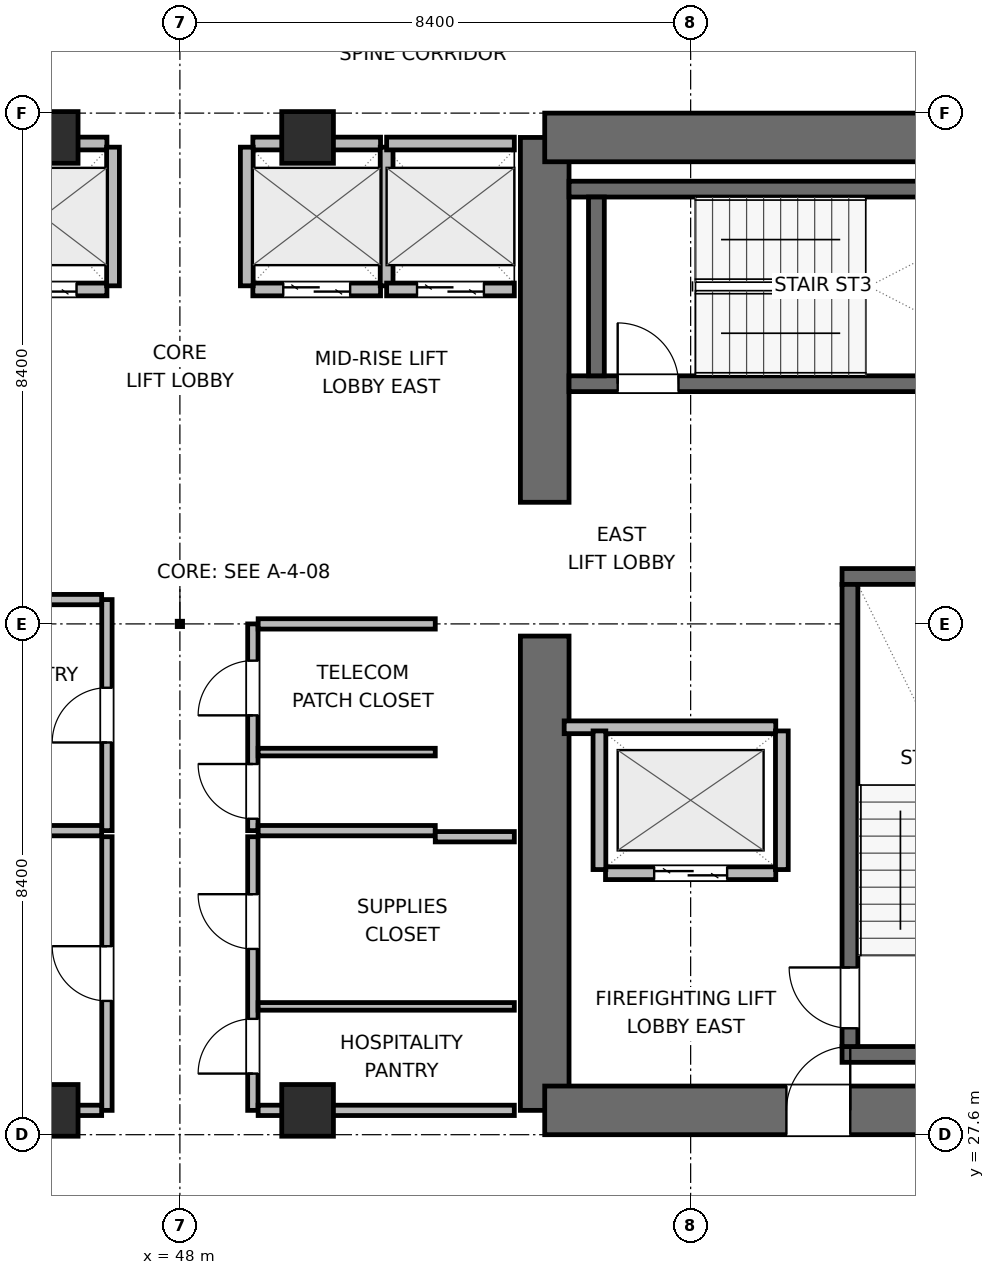
"""IFC4 building model, lengths in metres.
Left out: names, types, materials, properties, quantities, classifications, styles, units other than length and angle.
Written with IfcOpenShell. Run it as: python <this file> out.ifc"""

import sys

from ifc_helpers import new_model, si_unit, direction, frame, frame_2d, origin, origin_2d, place, context, subcontext, project, spatial, rectangle, extrude, element, fill, save


model = new_model("IFC4")
c1 = context("Model", 3, precision=1e-05, world=origin(), true_north=direction((0.0, 1.0)))
c2 = subcontext(c1, "Body", "Model", "MODEL_VIEW")
j1 = project(units=[si_unit("LENGTHUNIT", "METRE"), si_unit("PLANEANGLEUNIT", "RADIAN")], contexts=[c1])
p1 = place(None, origin())
s1 = spatial("IfcSite", under=j1, at=p1, CompositionType="ELEMENT")
p2 = place(p1, origin())
s2 = spatial("IfcBuilding", under=s1, at=p2, CompositionType="ELEMENT")
p3 = place(p2, frame((0.0, 0.0, 154.5)))
s3 = spatial("IfcBuildingStorey", under=s2, at=p3, CompositionType="ELEMENT", Elevation=154.5)
p4 = place(p3, frame((54.0, 28.0, 0.0), z_axis=(0.0, 0.0, 1.0), x_axis=(0.0, 1.0, 0.0)))
e1 = element("IfcWall", 1, at=p4, inside=s3, PredefinedType="SHEAR", context=c2, shape_type="SweptSolid", body=[
    extrude(rectangle(XDim=7.8, YDim=0.8, at=frame_2d((3.9, 0.0))), origin(), (0.0, 0.0, 1.0), 3.9),
])
p5 = place(p3, frame((54.0, 38.0, 0.0), z_axis=(0.0, 0.0, 1.0), x_axis=(0.0, 1.0, 0.0)))
e2 = element("IfcWall", 2, at=p5, inside=s3, PredefinedType="SHEAR", context=c2, shape_type="SweptSolid", body=[
    extrude(rectangle(XDim=6.0, YDim=0.8, at=frame_2d((3.0, 0.0))), origin(), (0.0, 0.0, 1.0), 3.9),
])
p6 = place(p3, frame((54.0, 28.0, 0.0), z_axis=(0.0, 0.0, 1.0), x_axis=(1.0, 0.0, 0.0)))
e3 = element("IfcWall", 3, at=p6, inside=s3, PredefinedType="SHEAR", context=c2, shape_type="SweptSolid", body=[
    extrude(rectangle(XDim=9.2, YDim=0.8, at=frame_2d((4.6, 0.0))), origin(), (0.0, 0.0, 1.0), 3.9),
])
p7 = place(p6, frame((3.975, 0.0, 0.0)))
e4 = element("IfcOpeningElement", 4, at=p7, cuts=e3, PredefinedType="OPENING", context=c2, shape_type="SweptSolid", body=[
    extrude(rectangle(XDim=1.05, YDim=2.04, at=frame_2d((0.525, 1.02))), frame((0.0, 0.41, 0.0), z_axis=(0.0, -1.0, 0.0), x_axis=(1.0, 0.0, 0.0)), (0.0, 0.0, 1.0), 0.82),
])
p8 = place(p3, frame((54.0, 44.0, 0.0), z_axis=(0.0, 0.0, 1.0), x_axis=(1.0, 0.0, 0.0)))
e5 = element("IfcWall", 5, at=p8, inside=s3, PredefinedType="SHEAR", context=c2, shape_type="SweptSolid", body=[
    extrude(rectangle(XDim=9.2, YDim=0.8, at=frame_2d((4.6, 0.0))), origin(), (0.0, 0.0, 1.0), 3.9),
])
for number, where, z_axis, x_axis in (
    (6, (58.89, 28.92, 0.0), (0.0, 0.0, 1.0), (1.0, 0.0, 0.0)),
    (7, (58.89, 36.78, 0.0), (0.0, 0.0, 1.0), (1.0, 0.0, 0.0)),
):
    element("IfcWall", number, at=place(p3, frame(where, z_axis=z_axis, x_axis=x_axis)), inside=s3, PredefinedType="SHEAR", context=c2, shape_type="SweptSolid", body=[
        extrude(rectangle(XDim=3.91, YDim=0.26, at=frame_2d((1.955, 0.0))), origin(), (0.0, 0.0, 1.0), 3.9),
    ])
p9 = place(p3, frame((59.02, 29.05, 0.0), z_axis=(0.0, 0.0, 1.0), x_axis=(0.0, 1.0, 0.0)))
e8 = element("IfcWall", 8, at=p9, inside=s3, PredefinedType="SHEAR", context=c2, shape_type="SweptSolid", body=[
    extrude(rectangle(XDim=7.6, YDim=0.26, at=frame_2d((3.8, 0.0))), origin(), (0.0, 0.0, 1.0), 3.9),
])
p10 = place(p9, frame((0.3, 0.0, 0.0)))
e9 = element("IfcOpeningElement", 9, at=p10, cuts=e8, PredefinedType="OPENING", context=c2, shape_type="SweptSolid", body=[
    extrude(rectangle(XDim=1.0, YDim=2.04, at=frame_2d((0.5, 1.02))), frame((0.0, 0.14, 0.0), z_axis=(0.0, -1.0, 0.0), x_axis=(1.0, 0.0, 0.0)), (0.0, 0.0, 1.0), 0.28),
])
p11 = place(p3, frame((54.4, 39.95, 0.0), z_axis=(0.0, 0.0, 1.0), x_axis=(1.0, 0.0, 0.0)))
e10 = element("IfcWall", 10, at=p11, inside=s3, PredefinedType="SHEAR", context=c2, shape_type="SweptSolid", body=[
    extrude(rectangle(XDim=8.4, YDim=0.26, at=frame_2d((4.2, 0.0))), origin(), (0.0, 0.0, 1.0), 3.9),
])
p12 = place(p11, frame((0.8, 0.0, 0.0)))
e11 = element("IfcOpeningElement", 11, at=p12, cuts=e10, PredefinedType="OPENING", context=c2, shape_type="SweptSolid", body=[
    extrude(rectangle(XDim=1.0, YDim=2.04, at=frame_2d((0.5, 1.02))), frame((0.0, 0.14, 0.0), z_axis=(0.0, -1.0, 0.0), x_axis=(1.0, 0.0, 0.0)), (0.0, 0.0, 1.0), 0.28),
])
p13 = place(p3, frame((54.4, 43.15, 0.0), z_axis=(0.0, 0.0, 1.0), x_axis=(1.0, 0.0, 0.0)))
e12 = element("IfcWall", 12, at=p13, inside=s3, PredefinedType="SHEAR", context=c2, shape_type="SweptSolid", body=[
    extrude(rectangle(XDim=8.4, YDim=0.26, at=frame_2d((4.2, 0.0))), origin(), (0.0, 0.0, 1.0), 3.9),
])
p14 = place(p3, frame((54.85, 40.08, 0.0), z_axis=(0.0, 0.0, 1.0), x_axis=(0.0, 1.0, 0.0)))
e13 = element("IfcWall", 13, at=p14, inside=s3, PredefinedType="SHEAR", context=c2, shape_type="SweptSolid", body=[
    extrude(rectangle(XDim=2.94, YDim=0.26, at=frame_2d((1.47, 0.0))), origin(), (0.0, 0.0, 1.0), 3.9),
])
for number, where, z_axis, x_axis in (
    (14, (45.9, 28.0, 0.0), (0.0, 0.0, 1.0), (1.0, 0.0, 0.0)),
    (15, (50.1, 28.0, 0.0), (0.0, 0.0, 1.0), (1.0, 0.0, 0.0)),
    (16, (45.9, 44.0, 0.0), (0.0, 0.0, 1.0), (1.0, 0.0, 0.0)),
    (17, (50.1, 44.0, 0.0), (0.0, 0.0, 1.0), (1.0, 0.0, 0.0)),
):
    element("IfcColumn", number, at=place(p3, frame(where, z_axis=z_axis, x_axis=x_axis)), inside=s3, PredefinedType="COLUMN", context=c2, shape_type="SweptSolid", body=[
        extrude(rectangle(XDim=0.85, YDim=0.85, at=origin_2d()), origin(), (0.0, 0.0, 1.0), 3.9),
    ])
p15 = place(p3, frame((55.0, 31.9, 0.0), z_axis=(0.0, 0.0, 1.0), x_axis=(1.0, 0.0, 0.0)))
e18 = element("IfcWall", 18, at=p15, inside=s3, PredefinedType="PARTITIONING", context=c2, shape_type="SweptSolid", body=[
    extrude(rectangle(XDim=2.8, YDim=0.21, at=frame_2d((1.4, 0.0))), origin(), (0.0, 0.0, 1.0), 3.68),
])
p16 = place(p15, frame((0.8, 0.0, 0.0)))
e19 = element("IfcOpeningElement", 19, at=p16, cuts=e18, PredefinedType="OPENING", context=c2, shape_type="SweptSolid", body=[
    extrude(rectangle(XDim=1.2, YDim=2.04, at=frame_2d((0.6, 1.02))), frame((0.0, 0.115, 0.0), z_axis=(0.0, -1.0, 0.0), x_axis=(1.0, 0.0, 0.0)), (0.0, 0.0, 1.0), 0.23),
])
p17 = place(p3, frame((54.32, 34.3, 0.0), z_axis=(0.0, 0.0, 1.0), x_axis=(1.0, 0.0, 0.0)))
e20 = element("IfcWall", 20, at=p17, inside=s3, PredefinedType="PARTITIONING", context=c2, shape_type="SweptSolid", body=[
    extrude(rectangle(XDim=3.48, YDim=0.21, at=frame_2d((1.74, 0.0))), origin(), (0.0, 0.0, 1.0), 3.68),
])
for number, where, z_axis, x_axis in (
    (21, (54.9, 31.96, 0.0), (0.0, 0.0, 1.0), (0.0, 1.0, 0.0)),
    (22, (57.9, 31.96, 0.0), (0.0, 0.0, 1.0), (0.0, 1.0, 0.0)),
):
    element("IfcWall", number, at=place(p3, frame(where, z_axis=z_axis, x_axis=x_axis)), inside=s3, PredefinedType="PARTITIONING", context=c2, shape_type="SweptSolid", body=[
        extrude(rectangle(XDim=2.28, YDim=0.21, at=frame_2d((1.14, 0.0))), origin(), (0.0, 0.0, 1.0), 3.68),
    ])
p18 = place(p3, frame((44.7, 41.5, 0.0), z_axis=(0.0, 0.0, 1.0), x_axis=(1.0, 0.0, 0.0)))
e23 = element("IfcWall", 23, at=p18, inside=s3, PredefinedType="PARTITIONING", context=c2, shape_type="SweptSolid", body=[
    extrude(rectangle(XDim=2.1, YDim=0.21, at=frame_2d((1.05, 0.0))), origin(), (0.0, 0.0, 1.0), 3.68),
])
p19 = place(p18, frame((0.5, 0.0, 0.0)))
e24 = element("IfcOpeningElement", 24, at=p19, cuts=e23, PredefinedType="OPENING", context=c2, shape_type="SweptSolid", body=[
    extrude(rectangle(XDim=1.1, YDim=2.04, at=frame_2d((0.55, 1.02))), frame((0.0, 0.115, 0.0), z_axis=(0.0, -1.0, 0.0), x_axis=(1.0, 0.0, 0.0)), (0.0, 0.0, 1.0), 0.23),
])
p20 = place(p3, frame((44.7, 43.9, 0.0), z_axis=(0.0, 0.0, 1.0), x_axis=(1.0, 0.0, 0.0)))
e25 = element("IfcWall", 25, at=p20, inside=s3, PredefinedType="PARTITIONING", context=c2, shape_type="SweptSolid", body=[
    extrude(rectangle(XDim=2.1, YDim=0.21, at=frame_2d((1.05, 0.0))), origin(), (0.0, 0.0, 1.0), 2.565),
])
p21 = place(p3, frame((46.9, 41.56, 0.0), z_axis=(0.0, 0.0, 1.0), x_axis=(0.0, 1.0, 0.0)))
e26 = element("IfcWall", 26, at=p21, inside=s3, PredefinedType="PARTITIONING", context=c2, shape_type="SweptSolid", body=[
    extrude(rectangle(XDim=2.28, YDim=0.21, at=frame_2d((1.14, 0.0))), origin(), (0.0, 0.0, 1.0), 3.68),
])
p22 = place(p3, frame((49.2, 41.5, 0.0), z_axis=(0.0, 0.0, 1.0), x_axis=(1.0, 0.0, 0.0)))
e27 = element("IfcWall", 27, at=p22, inside=s3, PredefinedType="PARTITIONING", context=c2, shape_type="SweptSolid", body=[
    extrude(rectangle(XDim=2.1, YDim=0.21, at=frame_2d((1.05, 0.0))), origin(), (0.0, 0.0, 1.0), 3.68),
])
p23 = place(p22, frame((0.5, 0.0, 0.0)))
e28 = element("IfcOpeningElement", 28, at=p23, cuts=e27, PredefinedType="OPENING", context=c2, shape_type="SweptSolid", body=[
    extrude(rectangle(XDim=1.1, YDim=2.04, at=frame_2d((0.55, 1.02))), frame((0.0, 0.115, 0.0), z_axis=(0.0, -1.0, 0.0), x_axis=(1.0, 0.0, 0.0)), (0.0, 0.0, 1.0), 0.23),
])
p24 = place(p3, frame((49.2, 43.9, 0.0), z_axis=(0.0, 0.0, 1.0), x_axis=(1.0, 0.0, 0.0)))
e29 = element("IfcWall", 29, at=p24, inside=s3, PredefinedType="PARTITIONING", context=c2, shape_type="SweptSolid", body=[
    extrude(rectangle(XDim=2.1, YDim=0.21, at=frame_2d((1.05, 0.0))), origin(), (0.0, 0.0, 1.0), 2.565),
])
for number, where, z_axis, x_axis in (
    (30, (49.1, 41.56, 0.0), (0.0, 0.0, 1.0), (0.0, 1.0, 0.0)),
    (31, (51.4, 41.56, 0.0), (0.0, 0.0, 1.0), (0.0, 1.0, 0.0)),
):
    element("IfcWall", number, at=place(p3, frame(where, z_axis=z_axis, x_axis=x_axis)), inside=s3, PredefinedType="PARTITIONING", context=c2, shape_type="SweptSolid", body=[
        extrude(rectangle(XDim=2.28, YDim=0.21, at=frame_2d((1.14, 0.0))), origin(), (0.0, 0.0, 1.0), 3.68),
    ])
p25 = place(p3, frame((51.4, 41.5, 0.0), z_axis=(0.0, 0.0, 1.0), x_axis=(1.0, 0.0, 0.0)))
e32 = element("IfcWall", 32, at=p25, inside=s3, PredefinedType="PARTITIONING", context=c2, shape_type="SweptSolid", body=[
    extrude(rectangle(XDim=2.1, YDim=0.21, at=frame_2d((1.05, 0.0))), origin(), (0.0, 0.0, 1.0), 3.68),
])
p26 = place(p25, frame((0.5, 0.0, 0.0)))
e33 = element("IfcOpeningElement", 33, at=p26, cuts=e32, PredefinedType="OPENING", context=c2, shape_type="SweptSolid", body=[
    extrude(rectangle(XDim=1.1, YDim=2.04, at=frame_2d((0.55, 1.02))), frame((0.0, 0.115, 0.0), z_axis=(0.0, -1.0, 0.0), x_axis=(1.0, 0.0, 0.0)), (0.0, 0.0, 1.0), 0.23),
])
p27 = place(p3, frame((51.4, 43.9, 0.0), z_axis=(0.0, 0.0, 1.0), x_axis=(1.0, 0.0, 0.0)))
e34 = element("IfcWall", 34, at=p27, inside=s3, PredefinedType="PARTITIONING", context=c2, shape_type="SweptSolid", body=[
    extrude(rectangle(XDim=2.1, YDim=0.21, at=frame_2d((1.05, 0.0))), origin(), (0.0, 0.0, 1.0), 2.565),
])
p28 = place(p3, frame((46.8, 32.6, 0.0), z_axis=(0.0, 0.0, 1.0), x_axis=(0.0, 1.0, 0.0)))
e35 = element("IfcWall", 35, at=p28, inside=s3, PredefinedType="PARTITIONING", context=c2, shape_type="SweptSolid", body=[
    extrude(rectangle(XDim=3.8, YDim=0.17, at=frame_2d((1.9, 0.0))), origin(), (0.0, 0.0, 1.0), 3.68),
])
p29 = place(p28, frame((1.45, 0.0, 0.0)))
e36 = element("IfcOpeningElement", 36, at=p29, cuts=e35, PredefinedType="OPENING", context=c2, shape_type="SweptSolid", body=[
    extrude(rectangle(XDim=0.9, YDim=2.02, at=frame_2d((0.45, 1.01))), frame((0.0, 0.095, 0.0), z_axis=(0.0, -1.0, 0.0), x_axis=(1.0, 0.0, 0.0)), (0.0, 0.0, 1.0), 0.19),
])
for number, where, z_axis, x_axis in (
    (37, (43.8, 32.6, 0.0), (0.0, 0.0, 1.0), (1.0, 0.0, 0.0)),
    (38, (43.8, 36.4, 0.0), (0.0, 0.0, 1.0), (1.0, 0.0, 0.0)),
):
    element("IfcWall", number, at=place(p3, frame(where, z_axis=z_axis, x_axis=x_axis)), inside=s3, PredefinedType="PARTITIONING", context=c2, shape_type="SweptSolid", body=[
        extrude(rectangle(XDim=2.913, YDim=0.17, at=frame_2d((1.457, 0.0))), origin(), (0.0, 0.0, 1.0), 3.68),
    ])
p30 = place(p3, frame((49.2, 32.6, 0.0), z_axis=(0.0, 0.0, 1.0), x_axis=(0.0, 1.0, 0.0)))
e39 = element("IfcWall", 39, at=p30, inside=s3, PredefinedType="PARTITIONING", context=c2, shape_type="SweptSolid", body=[
    extrude(rectangle(XDim=3.4, YDim=0.17, at=frame_2d((1.7, 0.0))), origin(), (0.0, 0.0, 1.0), 3.68),
])
p31 = place(p30, frame((0.196, 0.0, 0.0)))
e40 = element("IfcOpeningElement", 40, at=p31, cuts=e39, PredefinedType="OPENING", context=c2, shape_type="SweptSolid", body=[
    extrude(rectangle(XDim=0.9, YDim=2.02, at=frame_2d((0.45, 1.01))), frame((0.0, 0.095, 0.0), z_axis=(0.0, -1.0, 0.0), x_axis=(1.0, 0.0, 0.0)), (0.0, 0.0, 1.0), 0.19),
])
p32 = place(p30, frame((1.896, 0.0, 0.0)))
e41 = element("IfcOpeningElement", 41, at=p32, cuts=e39, PredefinedType="OPENING", context=c2, shape_type="SweptSolid", body=[
    extrude(rectangle(XDim=0.9, YDim=2.02, at=frame_2d((0.45, 1.01))), frame((0.0, 0.095, 0.0), z_axis=(0.0, -1.0, 0.0), x_axis=(1.0, 0.0, 0.0)), (0.0, 0.0, 1.0), 0.19),
])
for number, where, z_axis, x_axis in (
    (42, (49.287, 32.6, 0.0), (0.0, 0.0, 1.0), (1.0, 0.0, 0.0)),
    (43, (49.287, 36.0, 0.0), (0.0, 0.0, 1.0), (1.0, 0.0, 0.0)),
):
    element("IfcWall", number, at=place(p3, frame(where, z_axis=z_axis, x_axis=x_axis)), inside=s3, PredefinedType="PARTITIONING", context=c2, shape_type="SweptSolid", body=[
        extrude(rectangle(XDim=2.913, YDim=0.17, at=frame_2d((1.457, 0.0))), origin(), (0.0, 0.0, 1.0), 3.68),
    ])
p33 = place(p3, frame((49.287, 33.892, 0.0), z_axis=(0.0, 0.0, 1.0), x_axis=(1.0, 0.0, 0.0)))
e44 = element("IfcWall", 44, at=p33, inside=s3, PredefinedType="PARTITIONING", context=c2, shape_type="SweptSolid", body=[
    extrude(rectangle(XDim=2.913, YDim=0.125, at=frame_2d((1.457, 0.0))), origin(), (0.0, 0.0, 1.0), 3.68),
])
p34 = place(p3, frame((46.8, 28.0, 0.0), z_axis=(0.0, 0.0, 1.0), x_axis=(0.0, 1.0, 0.0)))
e45 = element("IfcWall", 45, at=p34, inside=s3, PredefinedType="PARTITIONING", context=c2, shape_type="SweptSolid", body=[
    extrude(rectangle(XDim=4.5, YDim=0.17, at=frame_2d((2.25, 0.0))), origin(), (0.0, 0.0, 1.0), 3.68),
])
p35 = place(p34, frame((1.8, 0.0, 0.0)))
e46 = element("IfcOpeningElement", 46, at=p35, cuts=e45, PredefinedType="OPENING", context=c2, shape_type="SweptSolid", body=[
    extrude(rectangle(XDim=0.9, YDim=2.02, at=frame_2d((0.45, 1.01))), frame((0.0, 0.095, 0.0), z_axis=(0.0, -1.0, 0.0), x_axis=(1.0, 0.0, 0.0)), (0.0, 0.0, 1.0), 0.19),
])
p36 = place(p3, frame((42.5, 28.0, 0.0), z_axis=(0.0, 0.0, 1.0), x_axis=(1.0, 0.0, 0.0)))
e47 = element("IfcWall", 47, at=p36, inside=s3, PredefinedType="PARTITIONING", context=c2, shape_type="SweptSolid", body=[
    extrude(rectangle(XDim=4.213, YDim=0.17, at=frame_2d((2.106, 0.0))), origin(), (0.0, 0.0, 1.0), 2.565),
])
p37 = place(p3, frame((49.2, 28.0, 0.0), z_axis=(0.0, 0.0, 1.0), x_axis=(0.0, 1.0, 0.0)))
e48 = element("IfcWall", 48, at=p37, inside=s3, PredefinedType="PARTITIONING", context=c2, shape_type="SweptSolid", body=[
    extrude(rectangle(XDim=4.5, YDim=0.17, at=frame_2d((2.25, 0.0))), origin(), (0.0, 0.0, 1.0), 3.68),
])
p38 = place(p37, frame((0.605, 0.0, 0.0)))
e49 = element("IfcOpeningElement", 49, at=p38, cuts=e48, PredefinedType="OPENING", context=c2, shape_type="SweptSolid", body=[
    extrude(rectangle(XDim=0.9, YDim=2.02, at=frame_2d((0.45, 1.01))), frame((0.0, 0.095, 0.0), z_axis=(0.0, -1.0, 0.0), x_axis=(1.0, 0.0, 0.0)), (0.0, 0.0, 1.0), 0.19),
])
p39 = place(p37, frame((2.655, 0.0, 0.0)))
e50 = element("IfcOpeningElement", 50, at=p39, cuts=e48, PredefinedType="OPENING", context=c2, shape_type="SweptSolid", body=[
    extrude(rectangle(XDim=0.9, YDim=2.02, at=frame_2d((0.45, 1.01))), frame((0.0, 0.095, 0.0), z_axis=(0.0, -1.0, 0.0), x_axis=(1.0, 0.0, 0.0)), (0.0, 0.0, 1.0), 0.19),
])
p40 = place(p3, frame((49.287, 28.0, 0.0), z_axis=(0.0, 0.0, 1.0), x_axis=(1.0, 0.0, 0.0)))
e51 = element("IfcWall", 51, at=p40, inside=s3, PredefinedType="PARTITIONING", context=c2, shape_type="SweptSolid", body=[
    extrude(rectangle(XDim=4.213, YDim=0.17, at=frame_2d((2.106, 0.0))), origin(), (0.0, 0.0, 1.0), 2.565),
])
p41 = place(p3, frame((52.2, 32.5, 0.0), z_axis=(0.0, 0.0, 1.0), x_axis=(1.0, 0.0, 0.0)))
e52 = element("IfcWall", 52, at=p41, inside=s3, PredefinedType="PARTITIONING", context=c2, shape_type="SweptSolid", body=[
    extrude(rectangle(XDim=1.3, YDim=0.17, at=frame_2d((0.65, 0.0))), origin(), (0.0, 0.0, 1.0), 3.68),
])
p42 = place(p3, frame((49.287, 29.71, 0.0), z_axis=(0.0, 0.0, 1.0), x_axis=(1.0, 0.0, 0.0)))
e53 = element("IfcWall", 53, at=p42, inside=s3, PredefinedType="PARTITIONING", context=c2, shape_type="SweptSolid", body=[
    extrude(rectangle(XDim=4.213, YDim=0.125, at=frame_2d((2.106, 0.0))), origin(), (0.0, 0.0, 1.0), 3.68),
])
p43 = place(p10, origin())
e54 = element("IfcDoor", 54, at=p43, inside=s3, OperationType="SINGLE_SWING_RIGHT", PredefinedType="DOOR", context=c2, shape_type="SweptSolid", body=[
    extrude(rectangle(XDim=1.0, YDim=2.04, at=frame_2d((0.5, 1.02))), frame((0.0, 0.025, 0.0), z_axis=(0.0, -1.0, 0.0), x_axis=(1.0, 0.0, 0.0)), (0.0, 0.0, 1.0), 0.05),
])
fill(e9, e54)
p44 = place(p12, origin())
e55 = element("IfcDoor", 55, at=p44, inside=s3, OperationType="SINGLE_SWING_LEFT", PredefinedType="DOOR", context=c2, shape_type="SweptSolid", body=[
    extrude(rectangle(XDim=1.0, YDim=2.04, at=frame_2d((0.5, 1.02))), frame((0.0, 0.025, 0.0), z_axis=(0.0, -1.0, 0.0), x_axis=(1.0, 0.0, 0.0)), (0.0, 0.0, 1.0), 0.05),
])
fill(e11, e55)
p45 = place(p16, origin())
e56 = element("IfcDoor", 56, at=p45, inside=s3, OperationType="DOUBLE_DOOR_SLIDING", PredefinedType="DOOR", context=c2, shape_type="SweptSolid", body=[
    extrude(rectangle(XDim=1.2, YDim=2.04, at=frame_2d((0.6, 1.02))), frame((0.0, 0.025, 0.0), z_axis=(0.0, -1.0, 0.0), x_axis=(1.0, 0.0, 0.0)), (0.0, 0.0, 1.0), 0.05),
])
fill(e19, e56)
p46 = place(p19, origin())
e57 = element("IfcDoor", 57, at=p46, inside=s3, OperationType="DOUBLE_DOOR_SLIDING", PredefinedType="DOOR", context=c2, shape_type="SweptSolid", body=[
    extrude(rectangle(XDim=1.1, YDim=2.04, at=frame_2d((0.55, 1.02))), frame((0.0, 0.025, 0.0), z_axis=(0.0, -1.0, 0.0), x_axis=(1.0, 0.0, 0.0)), (0.0, 0.0, 1.0), 0.05),
])
fill(e24, e57)
p47 = place(p23, origin())
e58 = element("IfcDoor", 58, at=p47, inside=s3, OperationType="DOUBLE_DOOR_SLIDING", PredefinedType="DOOR", context=c2, shape_type="SweptSolid", body=[
    extrude(rectangle(XDim=1.1, YDim=2.04, at=frame_2d((0.55, 1.02))), frame((0.0, 0.025, 0.0), z_axis=(0.0, -1.0, 0.0), x_axis=(1.0, 0.0, 0.0)), (0.0, 0.0, 1.0), 0.05),
])
fill(e28, e58)
p48 = place(p26, origin())
e59 = element("IfcDoor", 59, at=p48, inside=s3, OperationType="DOUBLE_DOOR_SLIDING", PredefinedType="DOOR", context=c2, shape_type="SweptSolid", body=[
    extrude(rectangle(XDim=1.1, YDim=2.04, at=frame_2d((0.55, 1.02))), frame((0.0, 0.025, 0.0), z_axis=(0.0, -1.0, 0.0), x_axis=(1.0, 0.0, 0.0)), (0.0, 0.0, 1.0), 0.05),
])
fill(e33, e59)
p49 = place(p7, origin())
e60 = element("IfcDoor", 60, at=p49, inside=s3, OperationType="SINGLE_SWING_RIGHT", PredefinedType="DOOR", context=c2, shape_type="SweptSolid", body=[
    extrude(rectangle(XDim=1.05, YDim=2.04, at=frame_2d((0.525, 1.02))), frame((0.0, 0.025, 0.0), z_axis=(0.0, -1.0, 0.0), x_axis=(1.0, 0.0, 0.0)), (0.0, 0.0, 1.0), 0.05),
])
fill(e4, e60)
p50 = place(p29, origin())
e61 = element("IfcDoor", 61, at=p50, inside=s3, OperationType="SINGLE_SWING_LEFT", PredefinedType="DOOR", context=c2, shape_type="SweptSolid", body=[
    extrude(rectangle(XDim=0.9, YDim=2.02, at=frame_2d((0.45, 1.01))), frame((0.0, 0.025, 0.0), z_axis=(0.0, -1.0, 0.0), x_axis=(1.0, 0.0, 0.0)), (0.0, 0.0, 1.0), 0.05),
])
fill(e36, e61)
p51 = place(p31, origin())
e62 = element("IfcDoor", 62, at=p51, inside=s3, OperationType="SINGLE_SWING_RIGHT", PredefinedType="DOOR", context=c2, shape_type="SweptSolid", body=[
    extrude(rectangle(XDim=0.9, YDim=2.02, at=frame_2d((0.45, 1.01))), frame((0.0, 0.025, 0.0), z_axis=(0.0, -1.0, 0.0), x_axis=(1.0, 0.0, 0.0)), (0.0, 0.0, 1.0), 0.05),
])
fill(e40, e62)
p52 = place(p32, origin())
e63 = element("IfcDoor", 63, at=p52, inside=s3, OperationType="SINGLE_SWING_LEFT", PredefinedType="DOOR", context=c2, shape_type="SweptSolid", body=[
    extrude(rectangle(XDim=0.9, YDim=2.02, at=frame_2d((0.45, 1.01))), frame((0.0, 0.025, 0.0), z_axis=(0.0, -1.0, 0.0), x_axis=(1.0, 0.0, 0.0)), (0.0, 0.0, 1.0), 0.05),
])
fill(e41, e63)
p53 = place(p35, origin())
e64 = element("IfcDoor", 64, at=p53, inside=s3, OperationType="SINGLE_SWING_RIGHT", PredefinedType="DOOR", context=c2, shape_type="SweptSolid", body=[
    extrude(rectangle(XDim=0.9, YDim=2.02, at=frame_2d((0.45, 1.01))), frame((0.0, 0.025, 0.0), z_axis=(0.0, -1.0, 0.0), x_axis=(1.0, 0.0, 0.0)), (0.0, 0.0, 1.0), 0.05),
])
fill(e46, e64)
p54 = place(p38, origin())
e65 = element("IfcDoor", 65, at=p54, inside=s3, OperationType="SINGLE_SWING_LEFT", PredefinedType="DOOR", context=c2, shape_type="SweptSolid", body=[
    extrude(rectangle(XDim=0.9, YDim=2.02, at=frame_2d((0.45, 1.01))), frame((0.0, 0.025, 0.0), z_axis=(0.0, -1.0, 0.0), x_axis=(1.0, 0.0, 0.0)), (0.0, 0.0, 1.0), 0.05),
])
fill(e49, e65)
p55 = place(p39, origin())
e66 = element("IfcDoor", 66, at=p55, inside=s3, OperationType="SINGLE_SWING_RIGHT", PredefinedType="DOOR", context=c2, shape_type="SweptSolid", body=[
    extrude(rectangle(XDim=0.9, YDim=2.02, at=frame_2d((0.45, 1.01))), frame((0.0, 0.025, 0.0), z_axis=(0.0, -1.0, 0.0), x_axis=(1.0, 0.0, 0.0)), (0.0, 0.0, 1.0), 0.05),
])
fill(e50, e66)
save(model, sys.argv[1])
